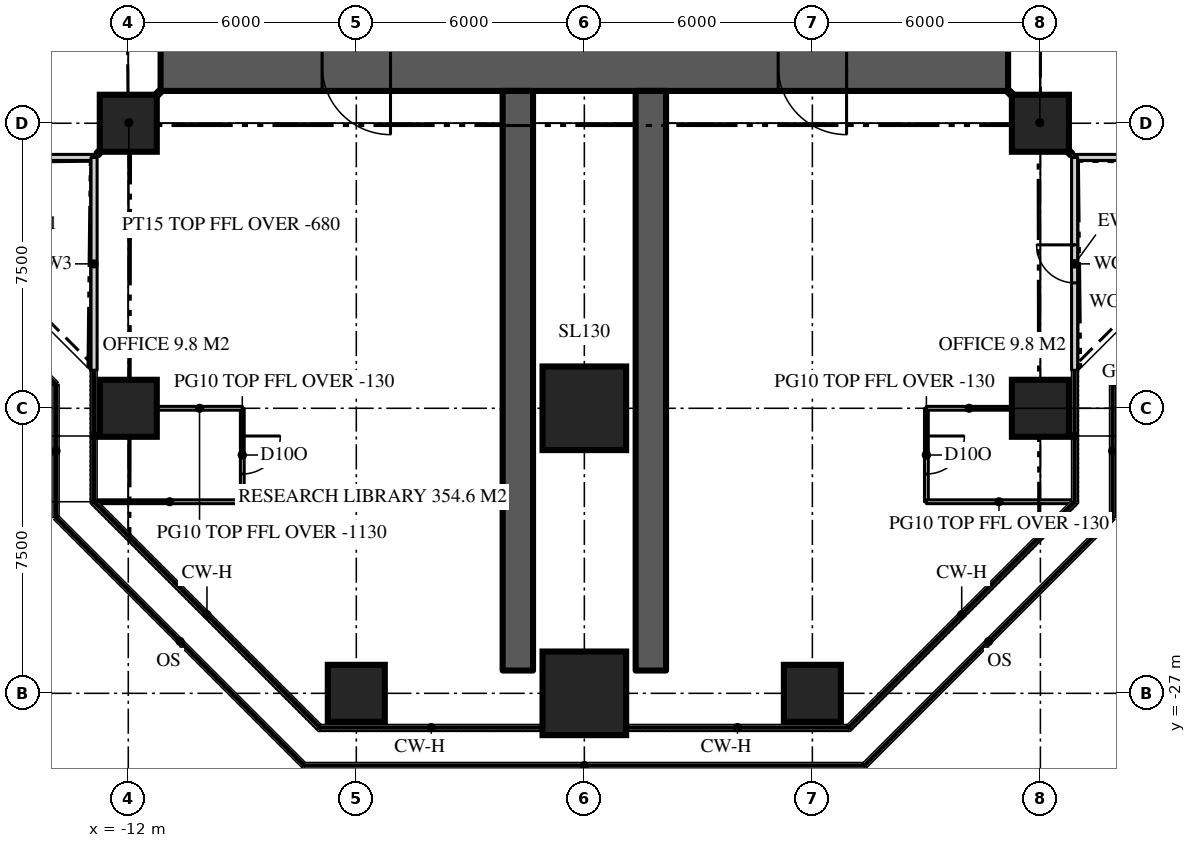
"""IFC4 building model, lengths in metres.
Left out: names, types, materials, properties, quantities, classifications, styles, units other than length and angle.
Written with IfcOpenShell. Run it as: python <this file> out.ifc"""

import sys

from ifc_helpers import new_model, si_unit, direction, frame, frame_2d, origin, origin_2d, place, context, subcontext, project, spatial, rectangle, extrude, element, fill, save


model = new_model("IFC4")
c1 = context("Model", 3, precision=1e-05, world=origin(), true_north=direction((0.0, 1.0)))
c2 = subcontext(c1, "Body", "Model", "MODEL_VIEW")
j1 = project(units=[si_unit("LENGTHUNIT", "METRE"), si_unit("PLANEANGLEUNIT", "RADIAN")], contexts=[c1])
p1 = place(None, origin())
s1 = spatial("IfcSite", under=j1, at=p1, CompositionType="ELEMENT")
p2 = place(p1, origin())
s2 = spatial("IfcBuilding", under=s1, at=p2, CompositionType="ELEMENT")
p3 = place(p2, frame((0.0, 0.0, 228.3)))
s3 = spatial("IfcBuildingStorey", under=s2, at=p3, CompositionType="ELEMENT", Elevation=228.3)
p4 = place(p3, frame((11.15, -10.5, 0.0), z_axis=(0.0, 0.0, 1.0), x_axis=(-1.0, 0.0, 0.0)))
e1 = element("IfcWall", 1, at=p4, inside=s3, PredefinedType="SHEAR", context=c2, shape_type="SweptSolid", body=[
    extrude(rectangle(XDim=22.3, YDim=1.3, at=frame_2d((11.15, 0.0))), origin(), (0.0, 0.0, 1.0), 3.9),
])
p5 = place(p4, frame((16.25, 0.0, 0.0)))
e2 = element("IfcOpeningElement", 2, at=p5, cuts=e1, PredefinedType="OPENING", context=c2, shape_type="SweptSolid", body=[
    extrude(rectangle(XDim=1.8, YDim=2.2, at=frame_2d((0.9, 1.1))), frame((0.0, 0.66, 0.0), z_axis=(0.0, -1.0, 0.0), x_axis=(1.0, 0.0, 0.0)), (0.0, 0.0, 1.0), 1.32),
])
p6 = place(p4, frame((4.25, 0.0, 0.0)))
e3 = element("IfcOpeningElement", 3, at=p6, cuts=e1, PredefinedType="OPENING", context=c2, shape_type="SweptSolid", body=[
    extrude(rectangle(XDim=1.8, YDim=2.2, at=frame_2d((0.9, 1.1))), frame((0.0, 0.66, 0.0), z_axis=(0.0, -1.0, 0.0), x_axis=(1.0, 0.0, 0.0)), (0.0, 0.0, 1.0), 1.32),
])
for number, where, z_axis, x_axis in (
    (4, (-1.75, -11.15, 0.0), (0.0, 0.0, 1.0), (0.0, -1.0, 0.0)),
    (5, (1.75, -11.15, 0.0), (0.0, 0.0, 1.0), (0.0, -1.0, 0.0)),
):
    element("IfcWall", number, at=place(p3, frame(where, z_axis=z_axis, x_axis=x_axis)), inside=s3, PredefinedType="SHEAR", context=c2, shape_type="SweptSolid", body=[
        extrude(rectangle(XDim=15.25, YDim=0.8, at=frame_2d((7.625, 0.0))), origin(), (0.0, 0.0, 1.0), 3.9),
    ])
p7 = place(p3, frame((-6.0, -27.0, 0.0), z_axis=(0.0, 0.0, 1.0), x_axis=(1.0, 0.0, 0.0)))
e6 = element("IfcColumn", 6, at=p7, inside=s3, PredefinedType="COLUMN", context=c2, shape_type="SweptSolid", body=[
    extrude(rectangle(XDim=1.5, YDim=1.5, at=origin_2d()), origin(), (0.0, 0.0, 1.0), 3.9),
])
p8 = place(p3, frame((0.0, -27.0, 0.0), z_axis=(0.0, 0.0, 1.0), x_axis=(1.0, 0.0, 0.0)))
e7 = element("IfcColumn", 7, at=p8, inside=s3, PredefinedType="COLUMN", context=c2, shape_type="SweptSolid", body=[
    extrude(rectangle(XDim=2.2, YDim=2.2, at=origin_2d()), origin(), (0.0, 0.0, 1.0), 3.9),
])
for number, where, z_axis, x_axis in (
    (8, (6.0, -27.0, 0.0), (0.0, 0.0, 1.0), (1.0, 0.0, 0.0)),
    (9, (-12.0, -19.5, 0.0), (0.0, 0.0, 1.0), (1.0, 0.0, 0.0)),
):
    element("IfcColumn", number, at=place(p3, frame(where, z_axis=z_axis, x_axis=x_axis)), inside=s3, PredefinedType="COLUMN", context=c2, shape_type="SweptSolid", body=[
        extrude(rectangle(XDim=1.5, YDim=1.5, at=origin_2d()), origin(), (0.0, 0.0, 1.0), 3.9),
    ])
p9 = place(p3, frame((0.0, -19.5, 0.0), z_axis=(0.0, 0.0, 1.0), x_axis=(1.0, 0.0, 0.0)))
e10 = element("IfcColumn", 10, at=p9, inside=s3, PredefinedType="COLUMN", context=c2, shape_type="SweptSolid", body=[
    extrude(rectangle(XDim=2.2, YDim=2.2, at=origin_2d()), origin(), (0.0, 0.0, 1.0), 3.9),
])
for number, where, z_axis, x_axis in (
    (11, (12.0, -19.5, 0.0), (0.0, 0.0, 1.0), (1.0, 0.0, 0.0)),
    (12, (-12.0, -12.0, 0.0), (0.0, 0.0, 1.0), (1.0, 0.0, 0.0)),
    (13, (12.0, -12.0, 0.0), (0.0, 0.0, 1.0), (1.0, 0.0, 0.0)),
):
    element("IfcColumn", number, at=place(p3, frame(where, z_axis=z_axis, x_axis=x_axis)), inside=s3, PredefinedType="COLUMN", context=c2, shape_type="SweptSolid", body=[
        extrude(rectangle(XDim=1.5, YDim=1.5, at=origin_2d()), origin(), (0.0, 0.0, 1.0), 3.9),
    ])
p10 = place(p3, frame((12.9, -12.9, 0.0), z_axis=(0.0, 0.0, 1.0), x_axis=(1.0, 0.0, 0.0)))
e14 = element("IfcWall", 14, at=p10, inside=s3, PredefinedType="SOLIDWALL", context=c2, shape_type="SweptSolid", body=[
    extrude(rectangle(XDim=5.6, YDim=0.16, at=frame_2d((2.8, 0.0))), origin(), (0.0, 0.0, 1.0), 3.77),
])
p11 = place(p3, frame((-18.5, -12.9, 0.0), z_axis=(0.0, 0.0, 1.0), x_axis=(1.0, 0.0, 0.0)))
e15 = element("IfcWall", 15, at=p11, inside=s3, PredefinedType="SOLIDWALL", context=c2, shape_type="SweptSolid", body=[
    extrude(rectangle(XDim=5.6, YDim=0.16, at=frame_2d((2.8, 0.0))), origin(), (0.0, 0.0, 1.0), 3.77),
])
p12 = place(p11, frame((2.3, 0.0, 0.0)))
e16 = element("IfcOpeningElement", 16, at=p12, cuts=e15, PredefinedType="OPENING", context=c2, shape_type="SweptSolid", body=[
    extrude(rectangle(XDim=1.0, YDim=2.2, at=frame_2d((0.5, 1.1))), frame((0.0, 0.09, 0.0), z_axis=(0.0, -1.0, 0.0), x_axis=(1.0, 0.0, 0.0)), (0.0, 0.0, 1.0), 0.18),
])
p13 = place(p3, frame((-12.9, -12.9, 0.0), z_axis=(0.0, 0.0, 1.0), x_axis=(0.0, -1.0, 0.0)))
e17 = element("IfcWall", 17, at=p13, inside=s3, PredefinedType="SOLIDWALL", context=c2, shape_type="SweptSolid", body=[
    extrude(rectangle(XDim=5.6, YDim=0.16, at=frame_2d((2.8, 0.0))), origin(), (0.0, 0.0, 1.0), 3.77),
])
p14 = place(p3, frame((12.9, -18.5, 0.0), z_axis=(0.0, 0.0, 1.0), x_axis=(0.0, 1.0, 0.0)))
e18 = element("IfcWall", 18, at=p14, inside=s3, PredefinedType="SOLIDWALL", context=c2, shape_type="SweptSolid", body=[
    extrude(rectangle(XDim=5.6, YDim=0.16, at=frame_2d((2.8, 0.0))), origin(), (0.0, 0.0, 1.0), 3.77),
])
p15 = place(p14, frame((2.3, 0.0, 0.0)))
e19 = element("IfcOpeningElement", 19, at=p15, cuts=e18, PredefinedType="OPENING", context=c2, shape_type="SweptSolid", body=[
    extrude(rectangle(XDim=1.0, YDim=2.2, at=frame_2d((0.5, 1.1))), frame((0.0, 0.09, 0.0), z_axis=(0.0, -1.0, 0.0), x_axis=(1.0, 0.0, 0.0)), (0.0, 0.0, 1.0), 0.18),
])
p16 = place(p3, frame((9.0, -19.5, 0.0), z_axis=(0.0, 0.0, 1.0), x_axis=(0.0, -1.0, 0.0)))
e20 = element("IfcWall", 20, at=p16, inside=s3, PredefinedType="PARTITIONING", context=c2, shape_type="SweptSolid", body=[
    extrude(rectangle(XDim=2.459, YDim=0.1, at=frame_2d((1.229, 0.0))), origin(), (0.0, 0.0, 1.0), 3.77),
])
p17 = place(p16, frame((0.729, 0.0, 0.0)))
e21 = element("IfcOpeningElement", 21, at=p17, cuts=e20, PredefinedType="OPENING", context=c2, shape_type="SweptSolid", body=[
    extrude(rectangle(XDim=1.0, YDim=2.2, at=frame_2d((0.5, 1.1))), frame((0.0, 0.06, 0.0), z_axis=(0.0, -1.0, 0.0), x_axis=(1.0, 0.0, 0.0)), (0.0, 0.0, 1.0), 0.12),
])
p18 = place(p3, frame((9.0, -19.5, 0.0), z_axis=(0.0, 0.0, 1.0), x_axis=(1.0, 0.0, 0.0)))
e22 = element("IfcWall", 22, at=p18, inside=s3, PredefinedType="PARTITIONING", context=c2, shape_type="SweptSolid", body=[
    extrude(rectangle(XDim=2.25, YDim=0.1, at=frame_2d((1.125, 0.0))), origin(), (0.0, 0.0, 1.0), 2.77),
])
p19 = place(p3, frame((9.0, -21.959, 0.0), z_axis=(0.0, 0.0, 1.0), x_axis=(1.0, 0.0, 0.0)))
e23 = element("IfcWall", 23, at=p19, inside=s3, PredefinedType="PARTITIONING", context=c2, shape_type="SweptSolid", body=[
    extrude(rectangle(XDim=3.82, YDim=0.1, at=frame_2d((1.91, 0.0))), origin(), (0.0, 0.0, 1.0), 3.77),
])
p20 = place(p3, frame((-9.0, -19.5, 0.0), z_axis=(0.0, 0.0, 1.0), x_axis=(0.0, -1.0, 0.0)))
e24 = element("IfcWall", 24, at=p20, inside=s3, PredefinedType="PARTITIONING", context=c2, shape_type="SweptSolid", body=[
    extrude(rectangle(XDim=2.459, YDim=0.1, at=frame_2d((1.229, 0.0))), origin(), (0.0, 0.0, 1.0), 3.77),
])
p21 = place(p20, frame((0.729, 0.0, 0.0)))
e25 = element("IfcOpeningElement", 25, at=p21, cuts=e24, PredefinedType="OPENING", context=c2, shape_type="SweptSolid", body=[
    extrude(rectangle(XDim=1.0, YDim=2.2, at=frame_2d((0.5, 1.1))), frame((0.0, 0.06, 0.0), z_axis=(0.0, -1.0, 0.0), x_axis=(1.0, 0.0, 0.0)), (0.0, 0.0, 1.0), 0.12),
])
p22 = place(p3, frame((-9.0, -19.5, 0.0), z_axis=(0.0, 0.0, 1.0), x_axis=(-1.0, 0.0, 0.0)))
e26 = element("IfcWall", 26, at=p22, inside=s3, PredefinedType="PARTITIONING", context=c2, shape_type="SweptSolid", body=[
    extrude(rectangle(XDim=2.25, YDim=0.1, at=frame_2d((1.125, 0.0))), origin(), (0.0, 0.0, 1.0), 2.77),
])
p23 = place(p3, frame((-9.0, -21.959, 0.0), z_axis=(0.0, 0.0, 1.0), x_axis=(-1.0, 0.0, 0.0)))
e27 = element("IfcWall", 27, at=p23, inside=s3, PredefinedType="PARTITIONING", context=c2, shape_type="SweptSolid", body=[
    extrude(rectangle(XDim=3.82, YDim=0.1, at=frame_2d((1.91, 0.0))), origin(), (0.0, 0.0, 1.0), 3.77),
])
for number, where, z_axis, x_axis in (
    (28, (-11.15, -11.15, 0.0), (0.0, 0.0, 1.0), (-0.707, -0.707, 0.0)),
    (29, (11.15, -11.15, 0.0), (0.0, 0.0, 1.0), (0.707, -0.707, 0.0)),
):
    element("IfcWall", number, at=place(p3, frame(where, z_axis=z_axis, x_axis=x_axis)), inside=s3, PredefinedType="PARTITIONING", context=c2, shape_type="SweptSolid", body=[
        extrude(rectangle(XDim=2.362, YDim=0.15, at=frame_2d((1.181, 0.0))), origin(), (0.0, 0.0, 1.0), 3.22),
    ])
p24 = place(p15, origin())
e30 = element("IfcDoor", 30, at=p24, inside=s3, OperationType="SINGLE_SWING_RIGHT", PredefinedType="DOOR", context=c2, shape_type="SweptSolid", body=[
    extrude(rectangle(XDim=1.0, YDim=2.2, at=frame_2d((0.5, 1.1))), frame((0.0, 0.025, 0.0), z_axis=(0.0, -1.0, 0.0), x_axis=(1.0, 0.0, 0.0)), (0.0, 0.0, 1.0), 0.05),
])
fill(e19, e30)
p25 = place(p5, origin())
e31 = element("IfcDoor", 31, at=p25, inside=s3, OperationType="DOUBLE_DOOR_DOUBLE_SWING", PredefinedType="DOOR", context=c2, shape_type="SweptSolid", body=[
    extrude(rectangle(XDim=1.8, YDim=2.2, at=frame_2d((0.9, 1.1))), frame((0.0, 0.025, 0.0), z_axis=(0.0, -1.0, 0.0), x_axis=(1.0, 0.0, 0.0)), (0.0, 0.0, 1.0), 0.05),
])
fill(e2, e31)
p26 = place(p6, origin())
e32 = element("IfcDoor", 32, at=p26, inside=s3, OperationType="DOUBLE_DOOR_DOUBLE_SWING", PredefinedType="DOOR", context=c2, shape_type="SweptSolid", body=[
    extrude(rectangle(XDim=1.8, YDim=2.2, at=frame_2d((0.9, 1.1))), frame((0.0, 0.025, 0.0), z_axis=(0.0, -1.0, 0.0), x_axis=(1.0, 0.0, 0.0)), (0.0, 0.0, 1.0), 0.05),
])
fill(e3, e32)
p27 = place(p17, origin())
e33 = element("IfcDoor", 33, at=p27, inside=s3, OperationType="SINGLE_SWING_LEFT", PredefinedType="DOOR", context=c2, shape_type="SweptSolid", body=[
    extrude(rectangle(XDim=1.0, YDim=2.2, at=frame_2d((0.5, 1.1))), frame((0.0, 0.025, 0.0), z_axis=(0.0, -1.0, 0.0), x_axis=(1.0, 0.0, 0.0)), (0.0, 0.0, 1.0), 0.05),
])
fill(e21, e33)
p28 = place(p21, origin())
e34 = element("IfcDoor", 34, at=p28, inside=s3, OperationType="SINGLE_SWING_LEFT", PredefinedType="DOOR", context=c2, shape_type="SweptSolid", body=[
    extrude(rectangle(XDim=1.0, YDim=2.2, at=frame_2d((0.5, 1.1))), frame((0.0, 0.025, 0.0), z_axis=(0.0, -1.0, 0.0), x_axis=(1.0, 0.0, 0.0)), (0.0, 0.0, 1.0), 0.05),
])
fill(e25, e34)
save(model, sys.argv[1])
